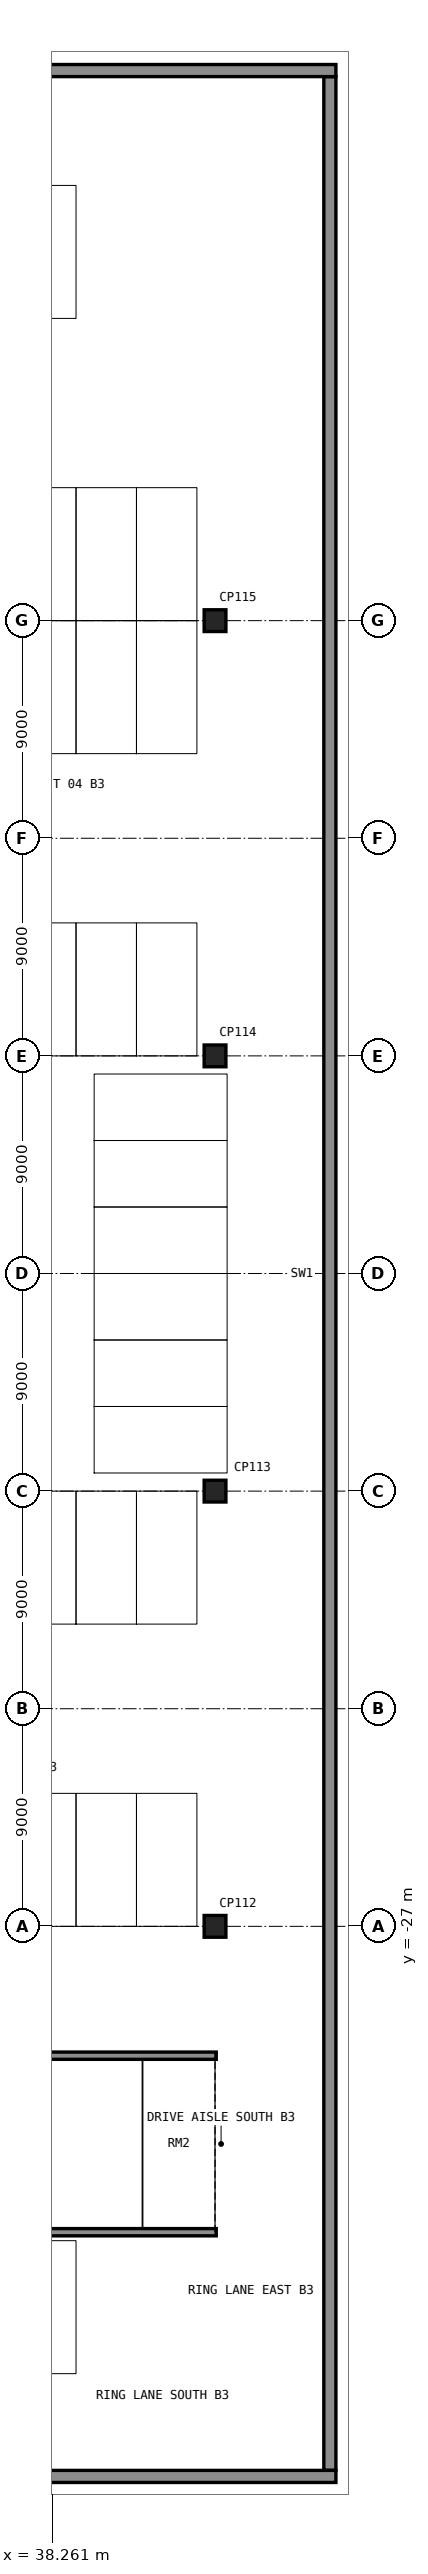
"""IFC4 building model, lengths in metres.
Left out: names, types, materials, properties, quantities, classifications, styles, units other than length and angle.
Written with IfcOpenShell. Run it as: python <this file> out.ifc"""

import sys

from ifc_helpers import new_model, si_unit, direction, frame, frame_2d, origin, origin_2d, place, context, subcontext, project, spatial, rectangle, extrude, element, save


model = new_model("IFC4")
c1 = context("Model", 3, precision=1e-05, world=origin(), true_north=direction((0.0, 1.0)))
c2 = subcontext(c1, "Body", "Model", "MODEL_VIEW")
j1 = project(units=[si_unit("LENGTHUNIT", "METRE"), si_unit("PLANEANGLEUNIT", "RADIAN")], contexts=[c1])
p1 = place(None, origin())
s1 = spatial("IfcSite", under=j1, at=p1, CompositionType="ELEMENT")
p2 = place(p1, origin())
s2 = spatial("IfcBuilding", under=s1, at=p2, CompositionType="ELEMENT")
p3 = place(p2, frame((0.0, 0.0, -12.9)))
s3 = spatial("IfcBuildingStorey", under=s2, at=p3, CompositionType="ELEMENT", Elevation=-12.9)
for number, where, z_axis, x_axis in (
    (1, (-50.0, 49.75, -0.3), (0.0, 0.0, 1.0), (1.0, 0.0, 0.0)),
    (2, (-50.0, -49.75, -0.3), (0.0, 0.0, 1.0), (1.0, 0.0, 0.0)),
):
    element("IfcWall", number, at=place(p3, frame(where, z_axis=z_axis, x_axis=x_axis)), inside=s3, PredefinedType="SOLIDWALL", context=c2, shape_type="SweptSolid", body=[
        extrude(rectangle(XDim=100.0, YDim=0.5, at=frame_2d((50.0, 0.0))), origin(), (0.0, 0.0, 1.0), 4.2),
    ])
p4 = place(p3, frame((49.75, -49.5, -0.3), z_axis=(0.0, 0.0, 1.0), x_axis=(0.0, 1.0, 0.0)))
e3 = element("IfcWall", 3, at=p4, inside=s3, PredefinedType="SOLIDWALL", context=c2, shape_type="SweptSolid", body=[
    extrude(rectangle(XDim=99.0, YDim=0.5, at=frame_2d((49.5, 0.0))), origin(), (0.0, 0.0, 1.0), 4.2),
])
for number, where, z_axis, x_axis in (
    (4, (45.0, -27.0, -0.3), (0.0, 0.0, 1.0), (1.0, 0.0, 0.0)),
    (5, (45.0, -9.0, -0.3), (0.0, 0.0, 1.0), (1.0, 0.0, 0.0)),
    (6, (45.0, 9.0, -0.3), (0.0, 0.0, 1.0), (1.0, 0.0, 0.0)),
    (7, (45.0, 27.0, -0.3), (0.0, 0.0, 1.0), (1.0, 0.0, 0.0)),
):
    element("IfcColumn", number, at=place(p3, frame(where, z_axis=z_axis, x_axis=x_axis)), inside=s3, PredefinedType="COLUMN", context=c2, shape_type="SweptSolid", body=[
        extrude(rectangle(XDim=0.9, YDim=0.9, at=origin_2d()), origin(), (0.0, 0.0, 1.0), 4.2),
    ])
for number, where, z_axis, x_axis in (
    (8, (10.5, -39.65, 0.0), (0.0, 0.0, 1.0), (1.0, 0.0, 0.0)),
    (9, (10.5, -32.35, 0.0), (0.0, 0.0, 1.0), (1.0, 0.0, 0.0)),
):
    element("IfcWall", number, at=place(p3, frame(where, z_axis=z_axis, x_axis=x_axis)), inside=s3, PredefinedType="SOLIDWALL", context=c2, shape_type="SweptSolid", body=[
        extrude(rectangle(XDim=34.55, YDim=0.3, at=frame_2d((17.275, 0.0))), origin(), (0.0, 0.0, 1.0), 4.2),
    ])
save(model, sys.argv[1])
